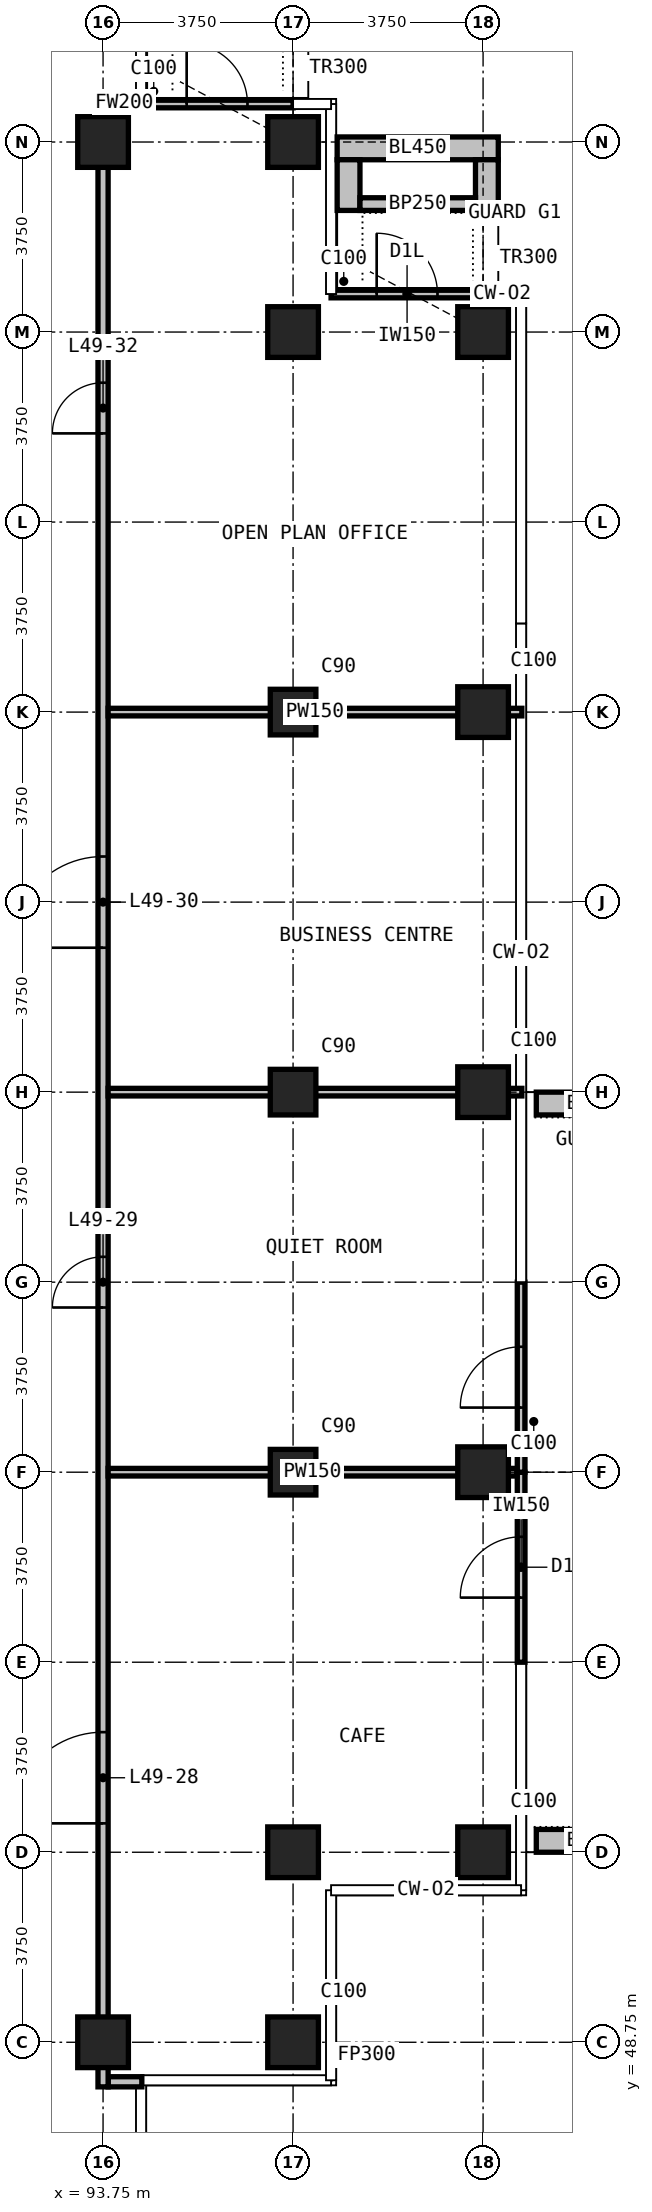
"""IFC4 building model, lengths in metres.
Left out: names, types, materials, properties, quantities, classifications, styles, units other than length and angle.
Written with IfcOpenShell. Run it as: python <this file> out.ifc"""

import sys

from ifc_helpers import new_model, si_unit, direction, frame, frame_2d, origin, origin_2d, place, context, subcontext, project, spatial, rectangle, extrude, element, fill, save


model = new_model("IFC4")
c1 = context("Model", 3, precision=1e-05, world=origin(), true_north=direction((0.0, 1.0)))
c2 = subcontext(c1, "Body", "Model", "MODEL_VIEW")
j1 = project(units=[si_unit("LENGTHUNIT", "METRE"), si_unit("PLANEANGLEUNIT", "RADIAN")], contexts=[c1])
p1 = place(None, origin())
s1 = spatial("IfcSite", under=j1, at=p1, CompositionType="ELEMENT")
p2 = place(p1, origin())
s2 = spatial("IfcBuilding", under=s1, at=p2, CompositionType="ELEMENT")
p3 = place(p2, frame((0.0, 0.0, 192.3)))
s3 = spatial("IfcBuildingStorey", under=s2, at=p3, CompositionType="ELEMENT", Elevation=192.3)
for number, where, z_axis, x_axis in (
    (1, (93.75, 48.75, 0.0), (0.0, 0.0, 1.0), (1.0, 0.0, 0.0)),
    (2, (93.75, 86.25, 0.0), (0.0, 0.0, 1.0), (1.0, 0.0, 0.0)),
    (3, (97.5, 48.75, 0.0), (0.0, 0.0, 1.0), (1.0, 0.0, 0.0)),
    (4, (97.5, 52.5, 0.0), (0.0, 0.0, 1.0), (1.0, 0.0, 0.0)),
):
    element("IfcColumn", number, at=place(p3, frame(where, z_axis=z_axis, x_axis=x_axis)), inside=s3, PredefinedType="COLUMN", context=c2, shape_type="SweptSolid", body=[
        extrude(rectangle(XDim=1.0, YDim=1.0, at=origin_2d()), origin(), (0.0, 0.0, 1.0), 3.6),
    ])
for number, where, z_axis, x_axis in (
    (5, (97.5, 60.0, 0.0), (0.0, 0.0, 1.0), (1.0, 0.0, 0.0)),
    (6, (97.5, 67.5, 0.0), (0.0, 0.0, 1.0), (1.0, 0.0, 0.0)),
    (7, (97.5, 75.0, 0.0), (0.0, 0.0, 1.0), (1.0, 0.0, 0.0)),
):
    element("IfcColumn", number, at=place(p3, frame(where, z_axis=z_axis, x_axis=x_axis)), inside=s3, PredefinedType="COLUMN", context=c2, shape_type="SweptSolid", body=[
        extrude(rectangle(XDim=0.9, YDim=0.9, at=origin_2d()), origin(), (0.0, 0.0, 1.0), 3.6),
    ])
for number, where, z_axis, x_axis in (
    (8, (97.5, 82.5, 0.0), (0.0, 0.0, 1.0), (1.0, 0.0, 0.0)),
    (9, (97.5, 86.25, 0.0), (0.0, 0.0, 1.0), (1.0, 0.0, 0.0)),
    (10, (101.25, 52.5, 0.0), (0.0, 0.0, 1.0), (1.0, 0.0, 0.0)),
    (11, (101.25, 60.0, 0.0), (0.0, 0.0, 1.0), (1.0, 0.0, 0.0)),
    (12, (101.25, 67.5, 0.0), (0.0, 0.0, 1.0), (1.0, 0.0, 0.0)),
    (13, (101.25, 75.0, 0.0), (0.0, 0.0, 1.0), (1.0, 0.0, 0.0)),
    (14, (101.25, 82.5, 0.0), (0.0, 0.0, 1.0), (1.0, 0.0, 0.0)),
):
    element("IfcColumn", number, at=place(p3, frame(where, z_axis=z_axis, x_axis=x_axis)), inside=s3, PredefinedType="COLUMN", context=c2, shape_type="SweptSolid", body=[
        extrude(rectangle(XDim=1.0, YDim=1.0, at=origin_2d()), origin(), (0.0, 0.0, 1.0), 3.6),
    ])
p4 = place(p3, frame((102.0, 56.25, 0.0), z_axis=(0.0, 0.0, 1.0), x_axis=(0.0, 1.0, 0.0)))
e15 = element("IfcWall", 15, at=p4, inside=s3, PredefinedType="SOLIDWALL", context=c2, shape_type="SweptSolid", body=[
    extrude(rectangle(XDim=3.75, YDim=0.15, at=frame_2d((1.875, 0.0))), origin(), (0.0, 0.0, 1.0), 3.3),
])
p5 = place(p4, frame((1.275, 0.0, 0.0)))
e16 = element("IfcOpeningElement", 16, at=p5, cuts=e15, PredefinedType="OPENING", context=c2, shape_type="SweptSolid", body=[
    extrude(rectangle(XDim=1.2, YDim=2.4, at=frame_2d((0.6, 1.2))), frame((0.0, 0.085, 0.0), z_axis=(0.0, -1.0, 0.0), x_axis=(1.0, 0.0, 0.0)), (0.0, 0.0, 1.0), 0.17),
])
p6 = place(p3, frame((102.0, 60.0, 0.0), z_axis=(0.0, 0.0, 1.0), x_axis=(0.0, 1.0, 0.0)))
e17 = element("IfcWall", 17, at=p6, inside=s3, PredefinedType="SOLIDWALL", context=c2, shape_type="SweptSolid", body=[
    extrude(rectangle(XDim=3.75, YDim=0.15, at=frame_2d((1.875, 0.0))), origin(), (0.0, 0.0, 1.0), 3.3),
])
p7 = place(p6, frame((1.275, 0.0, 0.0)))
e18 = element("IfcOpeningElement", 18, at=p7, cuts=e17, PredefinedType="OPENING", context=c2, shape_type="SweptSolid", body=[
    extrude(rectangle(XDim=1.2, YDim=2.4, at=frame_2d((0.6, 1.2))), frame((0.0, 0.085, 0.0), z_axis=(0.0, -1.0, 0.0), x_axis=(1.0, 0.0, 0.0)), (0.0, 0.0, 1.0), 0.17),
])
p8 = place(p3, frame((98.25, 83.25, 0.0), z_axis=(0.0, 0.0, 1.0), x_axis=(1.0, 0.0, 0.0)))
e19 = element("IfcWall", 19, at=p8, inside=s3, PredefinedType="SOLIDWALL", context=c2, shape_type="SweptSolid", body=[
    extrude(rectangle(XDim=3.0, YDim=0.15, at=frame_2d((1.5, 0.0))), origin(), (0.0, 0.0, 1.0), 3.3),
])
p9 = place(p8, frame((0.9, 0.0, 0.0)))
e20 = element("IfcOpeningElement", 20, at=p9, cuts=e19, PredefinedType="OPENING", context=c2, shape_type="SweptSolid", body=[
    extrude(rectangle(XDim=1.2, YDim=2.0, at=frame_2d((0.6, 1.0))), frame((0.0, 0.085, 0.0), z_axis=(0.0, -1.0, 0.0), x_axis=(1.0, 0.0, 0.0)), (0.0, 0.0, 1.0), 0.17),
])
p10 = place(p3, frame((94.5, 87.0, 0.0), z_axis=(0.0, 0.0, 1.0), x_axis=(1.0, 0.0, 0.0)))
e21 = element("IfcWall", 21, at=p10, inside=s3, PredefinedType="SOLIDWALL", context=c2, shape_type="SweptSolid", body=[
    extrude(rectangle(XDim=3.0, YDim=0.15, at=frame_2d((1.5, 0.0))), origin(), (0.0, 0.0, 1.0), 3.3),
])
p11 = place(p10, frame((0.9, 0.0, 0.0)))
e22 = element("IfcOpeningElement", 22, at=p11, cuts=e21, PredefinedType="OPENING", context=c2, shape_type="SweptSolid", body=[
    extrude(rectangle(XDim=1.2, YDim=2.0, at=frame_2d((0.6, 1.0))), frame((0.0, 0.085, 0.0), z_axis=(0.0, -1.0, 0.0), x_axis=(1.0, 0.0, 0.0)), (0.0, 0.0, 1.0), 0.17),
])
for number, where, z_axis, x_axis in (
    (23, (102.3, 52.725, 0.0), (0.0, 0.0, 1.0), (1.0, 0.0, 0.0)),
    (24, (102.3, 67.275, 0.0), (0.0, 0.0, 1.0), (1.0, 0.0, 0.0)),
):
    element("IfcWall", number, at=place(p3, frame(where, z_axis=z_axis, x_axis=x_axis)), inside=s3, PredefinedType="USERDEFINED", context=c2, shape_type="SweptSolid", body=[
        extrude(rectangle(XDim=2.35, YDim=0.45, at=frame_2d((1.175, 0.0))), origin(), (0.0, 0.0, 1.0), 1.1),
    ])
p12 = place(p3, frame((98.37, 86.125, 0.0), z_axis=(0.0, 0.0, 1.0), x_axis=(1.0, 0.0, 0.0)))
e25 = element("IfcWall", 25, at=p12, inside=s3, PredefinedType="USERDEFINED", context=c2, shape_type="SweptSolid", body=[
    extrude(rectangle(XDim=3.18, YDim=0.45, at=frame_2d((1.59, 0.0))), origin(), (0.0, 0.0, 1.0), 1.1),
])
for number, where, z_axis, x_axis in (
    (26, (98.595, 84.9, 0.0), (0.0, 0.0, 1.0), (0.0, 1.0, 0.0)),
    (27, (101.325, 84.9, 0.0), (0.0, 0.0, 1.0), (0.0, 1.0, 0.0)),
):
    element("IfcWall", number, at=place(p3, frame(where, z_axis=z_axis, x_axis=x_axis)), inside=s3, PredefinedType="USERDEFINED", context=c2, shape_type="SweptSolid", body=[
        extrude(rectangle(XDim=1.0, YDim=0.45, at=frame_2d((0.5, 0.0))), origin(), (0.0, 0.0, 1.0), 1.1),
    ])
p13 = place(p3, frame((98.82, 85.025, 0.0), z_axis=(0.0, 0.0, 1.0), x_axis=(1.0, 0.0, 0.0)))
e28 = element("IfcWall", 28, at=p13, inside=s3, PredefinedType="USERDEFINED", context=c2, shape_type="SweptSolid", body=[
    extrude(rectangle(XDim=2.28, YDim=0.25, at=frame_2d((1.14, 0.0))), origin(), (0.0, 0.0, 1.0), 1.0),
])
p14 = place(p3, frame((93.85, 47.97, 0.0), z_axis=(0.0, 0.0, 1.0), x_axis=(1.0, 0.0, 0.0)))
e29 = element("IfcWall", 29, at=p14, inside=s3, PredefinedType="PARTITIONING", context=c2, shape_type="SweptSolid", body=[
    extrude(rectangle(XDim=0.665, YDim=0.2, at=frame_2d((0.333, 0.0))), origin(), (0.0, 0.0, 1.0), 3.3),
])
p15 = place(p3, frame((93.85, 87.03, 0.0), z_axis=(0.0, 0.0, 1.0), x_axis=(1.0, 0.0, 0.0)))
e30 = element("IfcWall", 30, at=p15, inside=s3, PredefinedType="PARTITIONING", context=c2, shape_type="SweptSolid", body=[
    extrude(rectangle(XDim=0.64, YDim=0.2, at=frame_2d((0.32, 0.0))), origin(), (0.0, 0.0, 1.0), 3.3),
])
p16 = place(p3, frame((93.75, 47.87, 0.0), z_axis=(0.0, 0.0, 1.0), x_axis=(0.0, 1.0, 0.0)))
e31 = element("IfcWall", 31, at=p16, inside=s3, PredefinedType="PARTITIONING", context=c2, shape_type="SweptSolid", body=[
    extrude(rectangle(XDim=39.26, YDim=0.2, at=frame_2d((19.63, 0.0))), origin(), (0.0, 0.0, 1.0), 3.3),
])
p17 = place(p16, frame((5.2, 0.0, 0.0)))
e32 = element("IfcOpeningElement", 32, at=p17, cuts=e31, PredefinedType="OPENING", context=c2, shape_type="SweptSolid", body=[
    extrude(rectangle(XDim=1.8, YDim=2.2, at=frame_2d((0.9, 1.1))), frame((0.0, 0.11, 0.0), z_axis=(0.0, -1.0, 0.0), x_axis=(1.0, 0.0, 0.0)), (0.0, 0.0, 1.0), 0.22),
])
p18 = place(p16, frame((15.38, 0.0, 0.0)))
e33 = element("IfcOpeningElement", 33, at=p18, cuts=e31, PredefinedType="OPENING", context=c2, shape_type="SweptSolid", body=[
    extrude(rectangle(XDim=1.0, YDim=2.2, at=frame_2d((0.5, 1.1))), frame((0.0, 0.11, 0.0), z_axis=(0.0, -1.0, 0.0), x_axis=(1.0, 0.0, 0.0)), (0.0, 0.0, 1.0), 0.22),
])
p19 = place(p16, frame((22.48, 0.0, 0.0)))
e34 = element("IfcOpeningElement", 34, at=p19, cuts=e31, PredefinedType="OPENING", context=c2, shape_type="SweptSolid", body=[
    extrude(rectangle(XDim=1.8, YDim=2.2, at=frame_2d((0.9, 1.1))), frame((0.0, 0.11, 0.0), z_axis=(0.0, -1.0, 0.0), x_axis=(1.0, 0.0, 0.0)), (0.0, 0.0, 1.0), 0.22),
])
p20 = place(p16, frame((32.63, 0.0, 0.0)))
e35 = element("IfcOpeningElement", 35, at=p20, cuts=e31, PredefinedType="OPENING", context=c2, shape_type="SweptSolid", body=[
    extrude(rectangle(XDim=1.0, YDim=2.2, at=frame_2d((0.5, 1.1))), frame((0.0, 0.11, 0.0), z_axis=(0.0, -1.0, 0.0), x_axis=(1.0, 0.0, 0.0)), (0.0, 0.0, 1.0), 0.22),
])
p21 = place(p3, frame((93.85, 60.0, 0.0), z_axis=(0.0, 0.0, 1.0), x_axis=(1.0, 0.0, 0.0)))
e36 = element("IfcWall", 36, at=p21, inside=s3, PredefinedType="PARTITIONING", context=c2, shape_type="SweptSolid", body=[
    extrude(rectangle(XDim=8.065, YDim=0.15, at=frame_2d((4.032, 0.0))), origin(), (0.0, 0.0, 1.0), 3.3),
])
for number, where, z_axis, x_axis in (
    (37, (93.85, 67.5, 0.0), (0.0, 0.0, 1.0), (1.0, 0.0, 0.0)),
    (38, (93.85, 75.0, 0.0), (0.0, 0.0, 1.0), (1.0, 0.0, 0.0)),
):
    element("IfcWall", number, at=place(p3, frame(where, z_axis=z_axis, x_axis=x_axis)), inside=s3, PredefinedType="PARTITIONING", context=c2, shape_type="SweptSolid", body=[
        extrude(rectangle(XDim=8.165, YDim=0.15, at=frame_2d((4.083, 0.0))), origin(), (0.0, 0.0, 1.0), 3.3),
    ])
p22 = place(p5, origin())
e39 = element("IfcDoor", 39, at=p22, inside=s3, OperationType="SINGLE_SWING_LEFT", PredefinedType="DOOR", context=c2, shape_type="SweptSolid", body=[
    extrude(rectangle(XDim=1.2, YDim=2.4, at=frame_2d((0.6, 1.2))), frame((0.0, 0.025, 0.0), z_axis=(0.0, -1.0, 0.0), x_axis=(1.0, 0.0, 0.0)), (0.0, 0.0, 1.0), 0.05),
])
fill(e16, e39)
p23 = place(p7, origin())
e40 = element("IfcDoor", 40, at=p23, inside=s3, OperationType="SINGLE_SWING_LEFT", PredefinedType="DOOR", context=c2, shape_type="SweptSolid", body=[
    extrude(rectangle(XDim=1.2, YDim=2.4, at=frame_2d((0.6, 1.2))), frame((0.0, 0.025, 0.0), z_axis=(0.0, -1.0, 0.0), x_axis=(1.0, 0.0, 0.0)), (0.0, 0.0, 1.0), 0.05),
])
fill(e18, e40)
p24 = place(p9, origin())
e41 = element("IfcDoor", 41, at=p24, inside=s3, OperationType="SINGLE_SWING_LEFT", PredefinedType="DOOR", context=c2, shape_type="SweptSolid", body=[
    extrude(rectangle(XDim=1.2, YDim=2.0, at=frame_2d((0.6, 1.0))), frame((0.0, 0.025, 0.0), z_axis=(0.0, -1.0, 0.0), x_axis=(1.0, 0.0, 0.0)), (0.0, 0.0, 1.0), 0.05),
])
fill(e20, e41)
p25 = place(p11, origin())
e42 = element("IfcDoor", 42, at=p25, inside=s3, OperationType="SINGLE_SWING_LEFT", PredefinedType="DOOR", context=c2, shape_type="SweptSolid", body=[
    extrude(rectangle(XDim=1.2, YDim=2.0, at=frame_2d((0.6, 1.0))), frame((0.0, 0.025, 0.0), z_axis=(0.0, -1.0, 0.0), x_axis=(1.0, 0.0, 0.0)), (0.0, 0.0, 1.0), 0.05),
])
fill(e22, e42)
p26 = place(p17, origin())
e43 = element("IfcDoor", 43, at=p26, inside=s3, OperationType="DOUBLE_DOOR_SINGLE_SWING", PredefinedType="DOOR", context=c2, shape_type="SweptSolid", body=[
    extrude(rectangle(XDim=1.8, YDim=2.2, at=frame_2d((0.9, 1.1))), frame((0.0, 0.025, 0.0), z_axis=(0.0, -1.0, 0.0), x_axis=(1.0, 0.0, 0.0)), (0.0, 0.0, 1.0), 0.05),
])
fill(e32, e43)
p27 = place(p18, origin())
e44 = element("IfcDoor", 44, at=p27, inside=s3, OperationType="SINGLE_SWING_RIGHT", PredefinedType="DOOR", context=c2, shape_type="SweptSolid", body=[
    extrude(rectangle(XDim=1.0, YDim=2.2, at=frame_2d((0.5, 1.1))), frame((0.0, 0.025, 0.0), z_axis=(0.0, -1.0, 0.0), x_axis=(1.0, 0.0, 0.0)), (0.0, 0.0, 1.0), 0.05),
])
fill(e33, e44)
p28 = place(p19, origin())
e45 = element("IfcDoor", 45, at=p28, inside=s3, OperationType="DOUBLE_DOOR_SINGLE_SWING", PredefinedType="DOOR", context=c2, shape_type="SweptSolid", body=[
    extrude(rectangle(XDim=1.8, YDim=2.2, at=frame_2d((0.9, 1.1))), frame((0.0, 0.025, 0.0), z_axis=(0.0, -1.0, 0.0), x_axis=(1.0, 0.0, 0.0)), (0.0, 0.0, 1.0), 0.05),
])
fill(e34, e45)
p29 = place(p20, origin())
e46 = element("IfcDoor", 46, at=p29, inside=s3, OperationType="SINGLE_SWING_LEFT", PredefinedType="DOOR", context=c2, shape_type="SweptSolid", body=[
    extrude(rectangle(XDim=1.0, YDim=2.2, at=frame_2d((0.5, 1.1))), frame((0.0, 0.025, 0.0), z_axis=(0.0, -1.0, 0.0), x_axis=(1.0, 0.0, 0.0)), (0.0, 0.0, 1.0), 0.05),
])
fill(e35, e46)
save(model, sys.argv[1])
